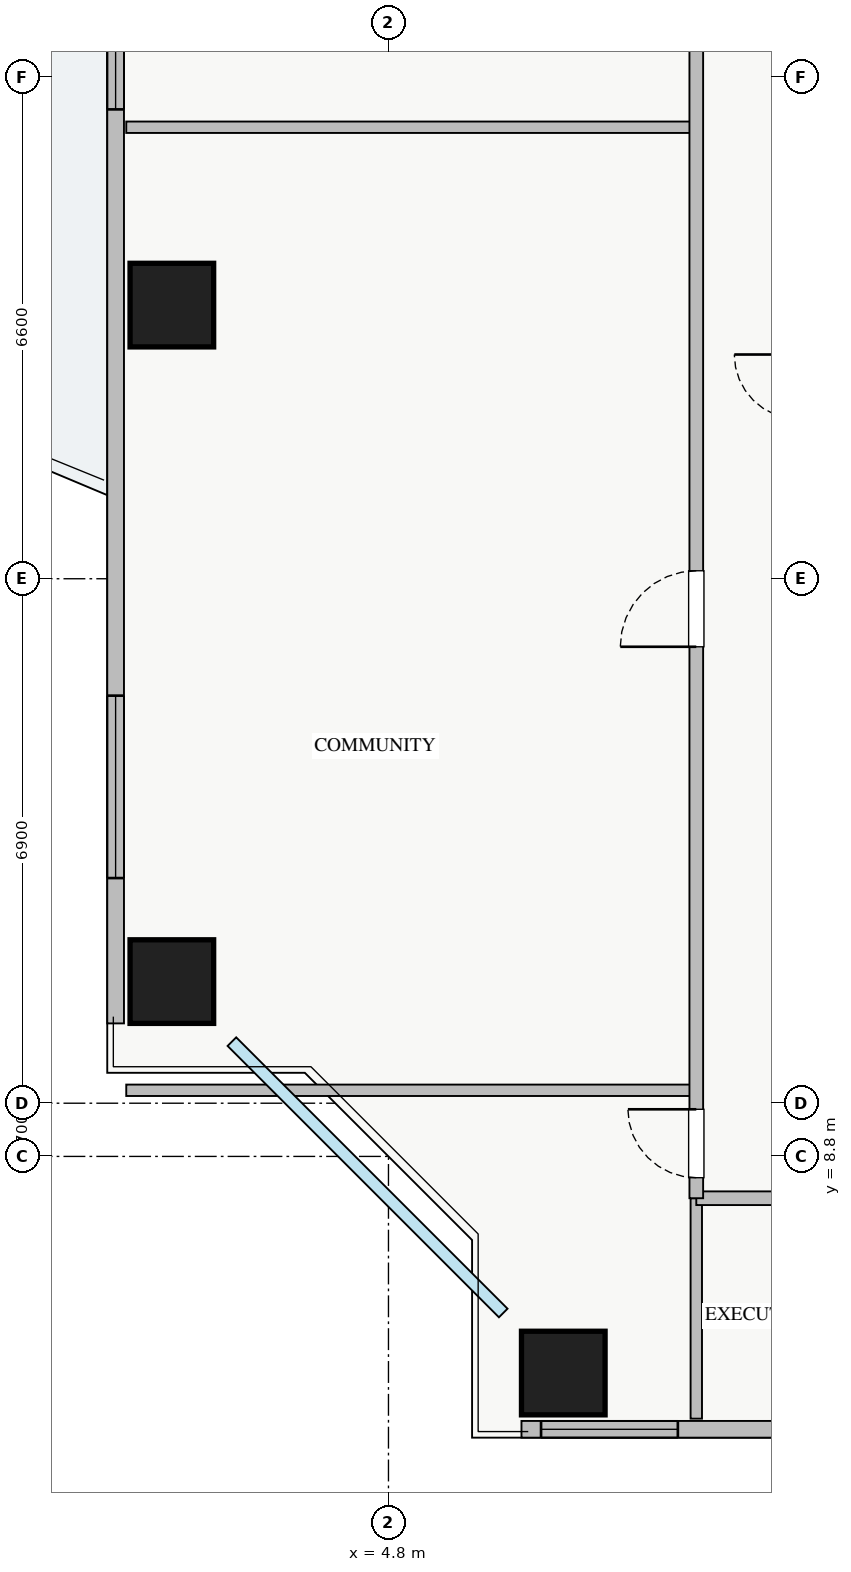
"""IFC4 building model, lengths in metres.
Left out: names, types, materials, properties, quantities, classifications, styles, units other than length and angle.
Written with IfcOpenShell. Run it as: python <this file> out.ifc"""

import sys

from ifc_helpers import new_model, si_unit, direction, frame, frame_2d, origin, origin_2d, place, context, subcontext, project, spatial, rectangle, extrude, source, transform, mapped, element, fill, save


model = new_model("IFC4")
c1 = context("Model", 3, precision=1e-05, world=origin(), true_north=direction((0.0, 1.0)))
c2 = subcontext(c1, "Body", "Model", "MODEL_VIEW")
j1 = project(units=[si_unit("LENGTHUNIT", "METRE"), si_unit("PLANEANGLEUNIT", "RADIAN")], contexts=[c1])
p1 = place(None, origin())
s1 = spatial("IfcSite", under=j1, at=p1, CompositionType="ELEMENT")
p2 = place(p1, origin())
s2 = spatial("IfcBuilding", under=s1, at=p2, CompositionType="ELEMENT")
p3 = place(p2, frame((0.0, 0.0, 119.75)))
s3 = spatial("IfcBuildingStorey", under=s2, at=p3, CompositionType="ELEMENT", Elevation=119.75)
m1 = source(origin(), c2, "Body", "SweptSolid", [
    extrude(rectangle(XDim=1.1, YDim=1.1, at=origin_2d()), origin(), (0.0, 0.0, 1.0), 3.25),
])
for number, where, z_axis, x_axis in (
    (1, (7.1, 5.95, 0.0), (0.0, 0.0, 1.0), (1.0, 0.0, 0.0)),
    (2, (1.95, 20.0, 0.0), (0.0, 0.0, 1.0), (1.0, 0.0, 0.0)),
    (3, (1.95, 11.1, 0.0), (0.0, 0.0, 1.0), (1.0, 0.0, 0.0)),
):
    element("IfcColumn", number, at=place(p3, frame(where, z_axis=z_axis, x_axis=x_axis)), inside=s3, PredefinedType="COLUMN", context=c2, shape_type="MappedRepresentation", body=[
        mapped(m1, transform((0.0, 0.0, 0.0), x_axis=(1.0, 0.0, 0.0), y_axis=(0.0, 1.0, 0.0), z_axis=(0.0, 0.0, 1.0), scale=1.0)),
    ])
p4 = place(p3, frame((6.55, 5.21, 0.0), z_axis=(0.0, 0.0, 1.0), x_axis=(1.0, 0.0, 0.0)))
e4 = element("IfcWall", 4, at=p4, inside=s3, PredefinedType="STANDARD", context=c2, shape_type="SweptSolid", body=[
    extrude(rectangle(XDim=24.9, YDim=0.22, at=frame_2d((12.45, 0.0))), origin(), (0.0, 0.0, 1.0), 2.61),
])
p5 = place(p4, frame((13.3, 0.0, 0.0)))
e5 = element("IfcOpeningElement", 5, at=p5, cuts=e4, PredefinedType="OPENING", context=c2, shape_type="SweptSolid", body=[
    extrude(rectangle(XDim=1.2, YDim=2.1, at=frame_2d((0.6, 1.05))), frame((0.0, 0.12, 0.0), z_axis=(0.0, -1.0, 0.0), x_axis=(1.0, 0.0, 0.0)), (0.0, 0.0, 1.0), 0.24),
])
p6 = place(p4, frame((0.258, 0.0, 0.9)))
e6 = element("IfcOpeningElement", 6, at=p6, cuts=e4, PredefinedType="OPENING", context=c2, shape_type="SweptSolid", body=[
    extrude(rectangle(XDim=1.8, YDim=1.5, at=frame_2d((0.9, 0.75))), frame((0.0, 0.12, 0.0), z_axis=(0.0, -1.0, 0.0), x_axis=(1.0, 0.0, 0.0)), (0.0, 0.0, 1.0), 0.24),
])
p7 = place(p4, frame((9.775, 0.0, 0.9)))
e7 = element("IfcOpeningElement", 7, at=p7, cuts=e4, PredefinedType="OPENING", context=c2, shape_type="SweptSolid", body=[
    extrude(rectangle(XDim=1.8, YDim=1.5, at=frame_2d((0.9, 0.75))), frame((0.0, 0.12, 0.0), z_axis=(0.0, -1.0, 0.0), x_axis=(1.0, 0.0, 0.0)), (0.0, 0.0, 1.0), 0.24),
])
p8 = place(p4, frame((14.813, 0.0, 0.9)))
e8 = element("IfcOpeningElement", 8, at=p8, cuts=e4, PredefinedType="OPENING", context=c2, shape_type="SweptSolid", body=[
    extrude(rectangle(XDim=1.5, YDim=1.45, at=frame_2d((0.75, 0.725))), frame((0.0, 0.12, 0.0), z_axis=(0.0, -1.0, 0.0), x_axis=(1.0, 0.0, 0.0)), (0.0, 0.0, 1.0), 0.24),
])
p9 = place(p4, frame((20.738, 0.0, 0.9)))
e9 = element("IfcOpeningElement", 9, at=p9, cuts=e4, PredefinedType="OPENING", context=c2, shape_type="SweptSolid", body=[
    extrude(rectangle(XDim=2.1, YDim=1.48, at=frame_2d((1.05, 0.74))), frame((0.0, 0.12, 0.0), z_axis=(0.0, -1.0, 0.0), x_axis=(1.0, 0.0, 0.0)), (0.0, 0.0, 1.0), 0.24),
])
p10 = place(p4, frame((4.187, 0.0, 0.9)))
e10 = element("IfcOpeningElement", 10, at=p10, cuts=e4, PredefinedType="OPENING", context=c2, shape_type="SweptSolid", body=[
    extrude(rectangle(XDim=2.4, YDim=1.5, at=frame_2d((1.2, 0.75))), frame((0.0, 0.12, 0.0), z_axis=(0.0, -1.0, 0.0), x_axis=(1.0, 0.0, 0.0)), (0.0, 0.0, 1.0), 0.24),
])
p11 = place(p3, frame((1.21, 10.55, 0.0), z_axis=(0.0, 0.0, 1.0), x_axis=(0.0, 1.0, 0.0)))
e11 = element("IfcWall", 11, at=p11, inside=s3, PredefinedType="STANDARD", context=c2, shape_type="SweptSolid", body=[
    extrude(rectangle(XDim=24.9, YDim=0.22, at=frame_2d((12.45, 0.0))), origin(), (0.0, 0.0, 1.0), 2.61),
])
p12 = place(p11, frame((13.3, 0.0, 0.0)))
e12 = element("IfcOpeningElement", 12, at=p12, cuts=e11, PredefinedType="OPENING", context=c2, shape_type="SweptSolid", body=[
    extrude(rectangle(XDim=1.2, YDim=2.1, at=frame_2d((0.6, 1.05))), frame((0.0, 0.12, 0.0), z_axis=(0.0, -1.0, 0.0), x_axis=(1.0, 0.0, 0.0)), (0.0, 0.0, 1.0), 0.24),
])
p13 = place(p11, frame((1.912, 0.0, 0.9)))
e13 = element("IfcOpeningElement", 13, at=p13, cuts=e11, PredefinedType="OPENING", context=c2, shape_type="SweptSolid", body=[
    extrude(rectangle(XDim=2.4, YDim=1.48, at=frame_2d((1.2, 0.74))), frame((0.0, 0.12, 0.0), z_axis=(0.0, -1.0, 0.0), x_axis=(1.0, 0.0, 0.0)), (0.0, 0.0, 1.0), 0.24),
])
p14 = place(p11, frame((20.737, 0.0, 0.9)))
e14 = element("IfcOpeningElement", 14, at=p14, cuts=e11, PredefinedType="OPENING", context=c2, shape_type="SweptSolid", body=[
    extrude(rectangle(XDim=2.1, YDim=1.48, at=frame_2d((1.05, 0.74))), frame((0.0, 0.12, 0.0), z_axis=(0.0, -1.0, 0.0), x_axis=(1.0, 0.0, 0.0)), (0.0, 0.0, 1.0), 0.24),
])
p15 = place(p11, frame((12.025, 0.0, 0.9)))
e15 = element("IfcOpeningElement", 15, at=p15, cuts=e11, PredefinedType="OPENING", context=c2, shape_type="SweptSolid", body=[
    extrude(rectangle(XDim=0.9, YDim=1.2, at=frame_2d((0.45, 0.6))), frame((0.0, 0.12, 0.0), z_axis=(0.0, -1.0, 0.0), x_axis=(1.0, 0.0, 0.0)), (0.0, 0.0, 1.0), 0.24),
])
p16 = place(p3, frame((8.85, 5.35, 0.0), z_axis=(0.0, 0.0, 1.0), x_axis=(0.0, 1.0, 0.0)))
e16 = element("IfcWall", 16, at=p16, inside=s3, PredefinedType="PARTITIONING", context=c2, shape_type="SweptSolid", body=[
    extrude(rectangle(XDim=2.9, YDim=0.15, at=frame_2d((1.45, 0.0))), origin(), (0.0, 0.0, 1.0), 3.07),
])
p17 = place(p3, frame((8.85, 8.25, 0.0), z_axis=(0.0, 0.0, 1.0), x_axis=(1.0, 0.0, 0.0)))
e17 = element("IfcWall", 17, at=p17, inside=s3, PredefinedType="PARTITIONING", context=c2, shape_type="SweptSolid", body=[
    extrude(rectangle(XDim=23.57, YDim=0.18, at=frame_2d((11.785, 0.0))), origin(), (0.0, 0.0, 1.0), 3.07),
])
p18 = place(p17, frame((2.75, 0.0, 0.0)))
e18 = element("IfcOpeningElement", 18, at=p18, cuts=e17, PredefinedType="OPENING", context=c2, shape_type="SweptSolid", body=[
    extrude(rectangle(XDim=1.0, YDim=2.05, at=frame_2d((0.5, 1.025))), frame((0.0, 0.1, 0.0), z_axis=(0.0, -1.0, 0.0), x_axis=(1.0, 0.0, 0.0)), (0.0, 0.0, 1.0), 0.2),
])
p19 = place(p17, frame((7.875, 0.0, 0.0)))
e19 = element("IfcOpeningElement", 19, at=p19, cuts=e17, PredefinedType="OPENING", context=c2, shape_type="SweptSolid", body=[
    extrude(rectangle(XDim=1.0, YDim=2.05, at=frame_2d((0.5, 1.025))), frame((0.0, 0.1, 0.0), z_axis=(0.0, -1.0, 0.0), x_axis=(1.0, 0.0, 0.0)), (0.0, 0.0, 1.0), 0.2),
])
p20 = place(p17, frame((13.3, 0.0, 0.0)))
e20 = element("IfcOpeningElement", 20, at=p20, cuts=e17, PredefinedType="OPENING", context=c2, shape_type="SweptSolid", body=[
    extrude(rectangle(XDim=1.0, YDim=2.05, at=frame_2d((0.5, 1.025))), frame((0.0, 0.1, 0.0), z_axis=(0.0, -1.0, 0.0), x_axis=(1.0, 0.0, 0.0)), (0.0, 0.0, 1.0), 0.2),
])
p21 = place(p17, frame((19.74, 0.0, 0.0)))
e21 = element("IfcOpeningElement", 21, at=p21, cuts=e17, PredefinedType="OPENING", context=c2, shape_type="SweptSolid", body=[
    extrude(rectangle(XDim=1.0, YDim=2.05, at=frame_2d((0.5, 1.025))), frame((0.0, 0.1, 0.0), z_axis=(0.0, -1.0, 0.0), x_axis=(1.0, 0.0, 0.0)), (0.0, 0.0, 1.0), 0.2),
])
for number, where, z_axis, x_axis in (
    (22, (1.35, 9.67, 0.0), (0.0, 0.0, 1.0), (1.0, 0.0, 0.0)),
    (23, (1.35, 22.34, 0.0), (0.0, 0.0, 1.0), (1.0, 0.0, 0.0)),
):
    element("IfcWall", number, at=place(p3, frame(where, z_axis=z_axis, x_axis=x_axis)), inside=s3, PredefinedType="PARTITIONING", context=c2, shape_type="SweptSolid", body=[
        extrude(rectangle(XDim=7.5, YDim=0.15, at=frame_2d((3.75, 0.0))), origin(), (0.0, 0.0, 1.0), 3.07),
    ])
p22 = place(p3, frame((8.85, 8.25, 0.0), z_axis=(0.0, 0.0, 1.0), x_axis=(0.0, 1.0, 0.0)))
e24 = element("IfcWall", 24, at=p22, inside=s3, PredefinedType="PARTITIONING", context=c2, shape_type="SweptSolid", body=[
    extrude(rectangle(XDim=29.5, YDim=0.18, at=frame_2d((14.75, 0.0))), origin(), (0.0, 0.0, 1.0), 3.07),
])
p23 = place(p22, frame((28.155, 0.0, 0.0)))
e25 = element("IfcOpeningElement", 25, at=p23, cuts=e24, PredefinedType="OPENING", context=c2, shape_type="SweptSolid", body=[
    extrude(rectangle(XDim=0.9, YDim=2.05, at=frame_2d((0.45, 1.025))), frame((0.0, 0.1, 0.0), z_axis=(0.0, -1.0, 0.0), x_axis=(1.0, 0.0, 0.0)), (0.0, 0.0, 1.0), 0.2),
])
p24 = place(p22, frame((0.27, 0.0, 0.0)))
e26 = element("IfcOpeningElement", 26, at=p24, cuts=e24, PredefinedType="OPENING", context=c2, shape_type="SweptSolid", body=[
    extrude(rectangle(XDim=0.9, YDim=2.05, at=frame_2d((0.45, 1.025))), frame((0.0, 0.1, 0.0), z_axis=(0.0, -1.0, 0.0), x_axis=(1.0, 0.0, 0.0)), (0.0, 0.0, 1.0), 0.2),
])
p25 = place(p22, frame((7.255, 0.0, 0.0)))
e27 = element("IfcOpeningElement", 27, at=p25, cuts=e24, PredefinedType="OPENING", context=c2, shape_type="SweptSolid", body=[
    extrude(rectangle(XDim=1.0, YDim=2.05, at=frame_2d((0.5, 1.025))), frame((0.0, 0.1, 0.0), z_axis=(0.0, -1.0, 0.0), x_axis=(1.0, 0.0, 0.0)), (0.0, 0.0, 1.0), 0.2),
])
p26 = place(p22, frame((16.675, 0.0, 0.0)))
e28 = element("IfcOpeningElement", 28, at=p26, cuts=e24, PredefinedType="OPENING", context=c2, shape_type="SweptSolid", body=[
    extrude(rectangle(XDim=1.0, YDim=2.05, at=frame_2d((0.5, 1.025))), frame((0.0, 0.1, 0.0), z_axis=(0.0, -1.0, 0.0), x_axis=(1.0, 0.0, 0.0)), (0.0, 0.0, 1.0), 0.2),
])
m2 = source(origin(), c2, "Body", "SweptSolid", [
    extrude(rectangle(XDim=1.8, YDim=1.5, at=frame_2d((0.9, 0.75))), frame((0.0, 0.03, 0.0), z_axis=(0.0, -1.0, 0.0), x_axis=(1.0, 0.0, 0.0)), (0.0, 0.0, 1.0), 0.06),
])
p27 = place(p6, origin())
e29 = element("IfcWindow", 29, at=p27, inside=s3, PartitioningType="TRIPLE_PANEL_VERTICAL", PredefinedType="WINDOW", context=c2, shape_type="MappedRepresentation", body=[
    mapped(m2, transform((0.0, 0.0, 0.0), x_axis=(1.0, 0.0, 0.0), y_axis=(0.0, 1.0, 0.0), z_axis=(0.0, 0.0, 1.0), scale=1.0)),
])
fill(e6, e29)
m3 = source(origin(), c2, "Body", "SweptSolid", [
    extrude(rectangle(XDim=2.4, YDim=1.48, at=frame_2d((1.2, 0.74))), frame((0.0, 0.03, 0.0), z_axis=(0.0, -1.0, 0.0), x_axis=(1.0, 0.0, 0.0)), (0.0, 0.0, 1.0), 0.06),
])
p28 = place(p13, origin())
e30 = element("IfcWindow", 30, at=p28, inside=s3, PartitioningType="TRIPLE_PANEL_VERTICAL", PredefinedType="WINDOW", context=c2, shape_type="MappedRepresentation", body=[
    mapped(m3, transform((0.0, 0.0, 0.0), x_axis=(1.0, 0.0, 0.0), y_axis=(0.0, 1.0, 0.0), z_axis=(0.0, 0.0, 1.0), scale=1.0)),
])
fill(e13, e30)
m4 = source(origin(), c2, "Body", "SweptSolid", [
    extrude(rectangle(XDim=0.9, YDim=2.05, at=frame_2d((0.45, 1.025))), frame((0.0, 0.025, 0.0), z_axis=(0.0, -1.0, 0.0), x_axis=(1.0, 0.0, 0.0)), (0.0, 0.0, 1.0), 0.05),
])
p29 = place(p24, origin())
e31 = element("IfcDoor", 31, at=p29, inside=s3, OperationType="SINGLE_SWING_RIGHT", PredefinedType="DOOR", context=c2, shape_type="MappedRepresentation", body=[
    mapped(m4, transform((0.0, 0.0, 0.0), x_axis=(1.0, 0.0, 0.0), y_axis=(0.0, 1.0, 0.0), z_axis=(0.0, 0.0, 1.0), scale=1.0)),
])
fill(e26, e31)
m5 = source(origin(), c2, "Body", "SweptSolid", [
    extrude(rectangle(XDim=1.0, YDim=2.05, at=frame_2d((0.5, 1.025))), frame((0.0, 0.025, 0.0), z_axis=(0.0, -1.0, 0.0), x_axis=(1.0, 0.0, 0.0)), (0.0, 0.0, 1.0), 0.05),
])
p30 = place(p25, origin())
e32 = element("IfcDoor", 32, at=p30, inside=s3, OperationType="SINGLE_SWING_LEFT", PredefinedType="DOOR", context=c2, shape_type="MappedRepresentation", body=[
    mapped(m5, transform((0.0, 0.0, 0.0), x_axis=(1.0, 0.0, 0.0), y_axis=(0.0, 1.0, 0.0), z_axis=(0.0, 0.0, 1.0), scale=1.0)),
])
fill(e27, e32)
m6 = source(origin(), c2, "Body", "SweptSolid", [
    extrude(rectangle(XDim=0.9, YDim=1.2, at=frame_2d((0.45, 0.6))), frame((0.0, 0.03, 0.0), z_axis=(0.0, -1.0, 0.0), x_axis=(1.0, 0.0, 0.0)), (0.0, 0.0, 1.0), 0.06),
])
p31 = place(p15, origin())
e33 = element("IfcWindow", 33, at=p31, inside=s3, PartitioningType="SINGLE_PANEL", PredefinedType="WINDOW", context=c2, shape_type="MappedRepresentation", body=[
    mapped(m6, transform((0.0, 0.0, 0.0), x_axis=(1.0, 0.0, 0.0), y_axis=(0.0, 1.0, 0.0), z_axis=(0.0, 0.0, 1.0), scale=1.0)),
])
fill(e15, e33)
save(model, sys.argv[1])
